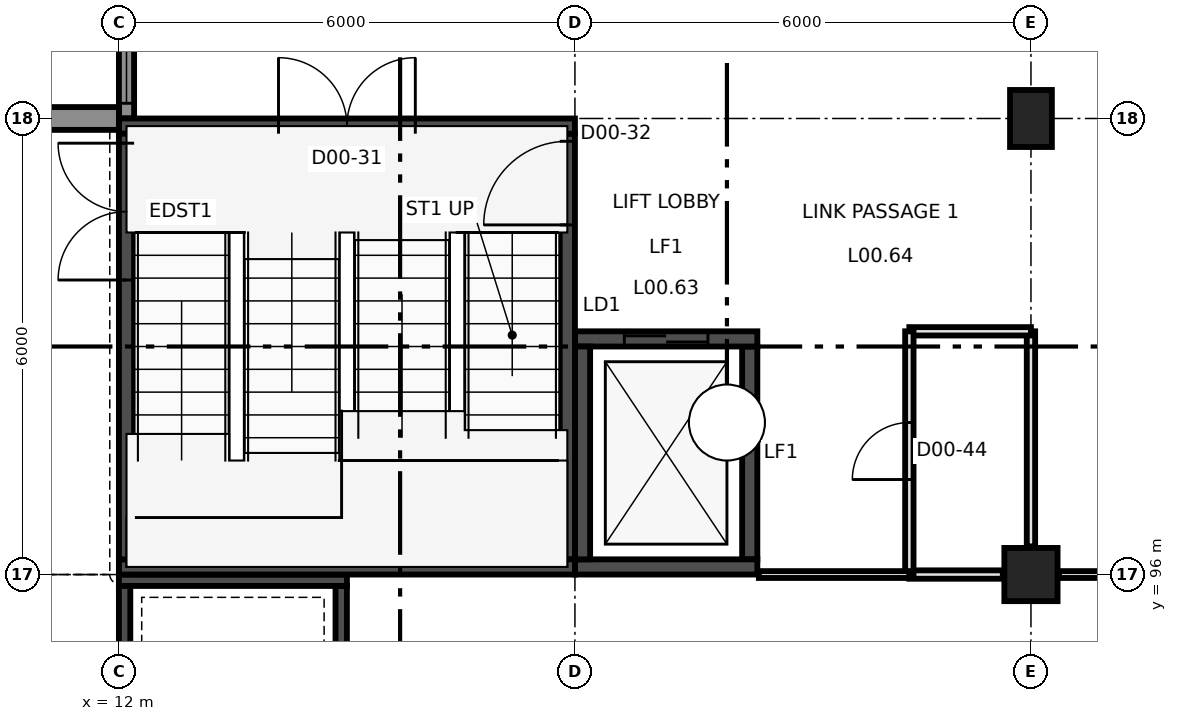
"""IFC4 building model, lengths in metres.
Left out: names, types, materials, properties, quantities, classifications, styles, units other than length and angle.
Written with IfcOpenShell. Run it as: python <this file> out.ifc"""

import sys

from ifc_helpers import new_model, si_unit, direction, frame, frame_2d, origin, origin_2d, place, context, subcontext, project, spatial, polyline, rectangle, outline, extrude, element, fill, save


model = new_model("IFC4")
c1 = context("Model", 3, precision=1e-05, world=origin(), true_north=direction((0.0, 1.0)))
c2 = subcontext(c1, "Body", "Model", "MODEL_VIEW")
j1 = project(units=[si_unit("LENGTHUNIT", "METRE"), si_unit("PLANEANGLEUNIT", "RADIAN")], contexts=[c1])
p1 = place(None, origin())
s1 = spatial("IfcSite", under=j1, at=p1, CompositionType="ELEMENT")
p2 = place(p1, origin())
s2 = spatial("IfcBuilding", under=s1, at=p2, CompositionType="ELEMENT")
p3 = place(p2, origin())
s3 = spatial("IfcBuildingStorey", under=s2, at=p3, CompositionType="ELEMENT", Elevation=0.0)
p4 = place(p3, frame((24.0, 96.0, -0.3), z_axis=(0.0, 0.0, 1.0), x_axis=(1.0, 0.0, 0.0)))
e1 = element("IfcColumn", 1, at=p4, inside=s3, PredefinedType="COLUMN", context=c2, shape_type="SweptSolid", body=[
    extrude(rectangle(XDim=0.7, YDim=0.7, at=origin_2d()), origin(), (0.0, 0.0, 1.0), 7.3),
])
p5 = place(p3, frame((24.0, 102.0, -0.3), z_axis=(0.0, 0.0, 1.0), x_axis=(1.0, 0.0, 0.0)))
e2 = element("IfcColumn", 2, at=p5, inside=s3, PredefinedType="COLUMN", context=c2, shape_type="SweptSolid", body=[
    extrude(rectangle(XDim=0.55, YDim=0.75, at=origin_2d()), origin(), (0.0, 0.0, 1.0), 7.3),
])
p6 = place(p3, frame((12.0, 101.9, -0.3), z_axis=(0.0, 0.0, 1.0), x_axis=(1.0, 0.0, 0.0)))
e3 = element("IfcWall", 3, at=p6, inside=s3, PredefinedType="SHEAR", context=c2, shape_type="SweptSolid", body=[
    extrude(rectangle(XDim=6.0, YDim=0.2, at=frame_2d((3.0, 0.0))), origin(), (0.0, 0.0, 1.0), 7.3),
])
p7 = place(p6, frame((2.1, 0.0, 0.3)))
e4 = element("IfcOpeningElement", 4, at=p7, cuts=e3, PredefinedType="OPENING", context=c2, shape_type="SweptSolid", body=[
    extrude(rectangle(XDim=1.8, YDim=2.2, at=frame_2d((0.9, 1.1))), frame((0.0, 0.11, 0.0), z_axis=(0.0, -1.0, 0.0), x_axis=(1.0, 0.0, 0.0)), (0.0, 0.0, 1.0), 0.22),
])
p8 = place(p3, frame((12.0, 96.1, -0.3), z_axis=(0.0, 0.0, 1.0), x_axis=(1.0, 0.0, 0.0)))
e5 = element("IfcWall", 5, at=p8, inside=s3, PredefinedType="SHEAR", context=c2, shape_type="SweptSolid", body=[
    extrude(rectangle(XDim=6.0, YDim=0.2, at=frame_2d((3.0, 0.0))), origin(), (0.0, 0.0, 1.0), 7.3),
])
p9 = place(p3, frame((12.1, 96.2, -0.3), z_axis=(0.0, 0.0, 1.0), x_axis=(0.0, 1.0, 0.0)))
e6 = element("IfcWall", 6, at=p9, inside=s3, PredefinedType="SHEAR", context=c2, shape_type="SweptSolid", body=[
    extrude(rectangle(XDim=5.6, YDim=0.2, at=frame_2d((2.8, 0.0))), origin(), (0.0, 0.0, 1.0), 7.3),
])
p10 = place(p9, frame((3.675, 0.0, 0.3)))
e7 = element("IfcOpeningElement", 7, at=p10, cuts=e6, PredefinedType="OPENING", context=c2, shape_type="SweptSolid", body=[
    extrude(rectangle(XDim=1.8, YDim=2.4, at=frame_2d((0.9, 1.2))), frame((0.0, 0.11, 0.0), z_axis=(0.0, -1.0, 0.0), x_axis=(1.0, 0.0, 0.0)), (0.0, 0.0, 1.0), 0.22),
])
p11 = place(p3, frame((17.9, 96.2, -0.3), z_axis=(0.0, 0.0, 1.0), x_axis=(0.0, 1.0, 0.0)))
e8 = element("IfcWall", 8, at=p11, inside=s3, PredefinedType="SHEAR", context=c2, shape_type="SweptSolid", body=[
    extrude(rectangle(XDim=5.6, YDim=0.2, at=frame_2d((2.8, 0.0))), origin(), (0.0, 0.0, 1.0), 7.3),
])
p12 = place(p11, frame((4.4, 0.0, 0.3)))
e9 = element("IfcOpeningElement", 9, at=p12, cuts=e8, PredefinedType="OPENING", context=c2, shape_type="SweptSolid", body=[
    extrude(rectangle(XDim=1.1, YDim=2.2, at=frame_2d((0.55, 1.1))), frame((0.0, 0.11, 0.0), z_axis=(0.0, -1.0, 0.0), x_axis=(1.0, 0.0, 0.0)), (0.0, 0.0, 1.0), 0.22),
])
p13 = place(p3, frame((18.0, 99.1, -1.4), z_axis=(0.0, 0.0, 1.0), x_axis=(1.0, 0.0, 0.0)))
e10 = element("IfcWall", 10, at=p13, inside=s3, PredefinedType="SHEAR", context=c2, shape_type="SweptSolid", body=[
    extrude(rectangle(XDim=2.4, YDim=0.2, at=frame_2d((1.2, 0.0))), origin(), (0.0, 0.0, 1.0), 8.4),
])
p14 = place(p13, frame((0.65, 0.0, 1.4)))
e11 = element("IfcOpeningElement", 11, at=p14, cuts=e10, PredefinedType="OPENING", context=c2, shape_type="SweptSolid", body=[
    extrude(rectangle(XDim=1.1, YDim=2.1, at=frame_2d((0.55, 1.05))), frame((0.0, 0.11, 0.0), z_axis=(0.0, -1.0, 0.0), x_axis=(1.0, 0.0, 0.0)), (0.0, 0.0, 1.0), 0.22),
])
p15 = place(p3, frame((18.0, 96.1, -1.4), z_axis=(0.0, 0.0, 1.0), x_axis=(1.0, 0.0, 0.0)))
e12 = element("IfcWall", 12, at=p15, inside=s3, PredefinedType="SHEAR", context=c2, shape_type="SweptSolid", body=[
    extrude(rectangle(XDim=2.4, YDim=0.2, at=frame_2d((1.2, 0.0))), origin(), (0.0, 0.0, 1.0), 8.4),
])
for number, where, z_axis, x_axis in (
    (13, (18.1, 96.2, -1.4), (0.0, 0.0, 1.0), (0.0, 1.0, 0.0)),
    (14, (20.3, 96.2, -1.4), (0.0, 0.0, 1.0), (0.0, 1.0, 0.0)),
):
    element("IfcWall", number, at=place(p3, frame(where, z_axis=z_axis, x_axis=x_axis)), inside=s3, PredefinedType="SHEAR", context=c2, shape_type="SweptSolid", body=[
        extrude(rectangle(XDim=2.8, YDim=0.2, at=frame_2d((1.4, 0.0))), origin(), (0.0, 0.0, 1.0), 8.4),
    ])
p16 = place(p3, frame((12.0, 95.925, -0.3), z_axis=(0.0, 0.0, 1.0), x_axis=(1.0, 0.0, 0.0)))
e15 = element("IfcWall", 15, at=p16, inside=s3, PredefinedType="SHEAR", context=c2, shape_type="SweptSolid", body=[
    extrude(rectangle(XDim=3.0, YDim=0.15, at=frame_2d((1.5, 0.0))), origin(), (0.0, 0.0, 1.0), 7.3),
])
for number, where, z_axis, x_axis in (
    (16, (12.075, 90.15, -0.3), (0.0, 0.0, 1.0), (0.0, 1.0, 0.0)),
    (17, (14.925, 90.15, -0.3), (0.0, 0.0, 1.0), (0.0, 1.0, 0.0)),
):
    element("IfcWall", number, at=place(p3, frame(where, z_axis=z_axis, x_axis=x_axis)), inside=s3, PredefinedType="SHEAR", context=c2, shape_type="SweptSolid", body=[
        extrude(rectangle(XDim=5.7, YDim=0.15, at=frame_2d((2.85, 0.0))), origin(), (0.0, 0.0, 1.0), 7.3),
    ])
p17 = place(p3, frame((12.1, 102.0, 0.0), z_axis=(0.0, 0.0, 1.0), x_axis=(0.0, 1.0, 0.0)))
e18 = element("IfcWall", 18, at=p17, inside=s3, PredefinedType="SOLIDWALL", context=c2, shape_type="SweptSolid", body=[
    extrude(rectangle(XDim=5.775, YDim=0.2, at=frame_2d((2.887, 0.0))), origin(), (0.0, 0.0, 1.0), 6.15),
])
p18 = place(p17, frame((2.07, 0.0, 0.0)))
e19 = element("IfcOpeningElement", 19, at=p18, cuts=e18, PredefinedType="OPENING", context=c2, shape_type="SweptSolid", body=[
    extrude(rectangle(XDim=1.8, YDim=2.4, at=frame_2d((0.9, 1.2))), frame((0.0, 0.11, 0.0), z_axis=(0.0, -1.0, 0.0), x_axis=(1.0, 0.0, 0.0)), (0.0, 0.0, 1.0), 0.22),
])
p19 = place(p17, frame((2.07, 0.0, 2.5)))
e20 = element("IfcOpeningElement", 20, at=p19, cuts=e18, PredefinedType="OPENING", context=c2, shape_type="SweptSolid", body=[
    extrude(rectangle(XDim=1.8, YDim=3.3, at=frame_2d((0.9, 1.65))), frame((0.0, 0.11, 0.0), z_axis=(0.0, -1.0, 0.0), x_axis=(1.0, 0.0, 0.0)), (0.0, 0.0, 1.0), 0.22),
])
p20 = place(p17, frame((0.2, 0.0, 0.1)))
e21 = element("IfcOpeningElement", 21, at=p20, cuts=e18, PredefinedType="OPENING", context=c2, shape_type="SweptSolid", body=[
    extrude(rectangle(XDim=1.87, YDim=5.7, at=frame_2d((0.935, 2.85))), frame((0.0, 0.11, 0.0), z_axis=(0.0, -1.0, 0.0), x_axis=(1.0, 0.0, 0.0)), (0.0, 0.0, 1.0), 0.22),
])
p21 = place(p17, frame((3.87, 0.0, 0.1)))
e22 = element("IfcOpeningElement", 22, at=p21, cuts=e18, PredefinedType="OPENING", context=c2, shape_type="SweptSolid", body=[
    extrude(rectangle(XDim=1.705, YDim=5.7, at=frame_2d((0.853, 2.85))), frame((0.0, 0.11, 0.0), z_axis=(0.0, -1.0, 0.0), x_axis=(1.0, 0.0, 0.0)), (0.0, 0.0, 1.0), 0.22),
])
p22 = place(p3, frame((6.3, 102.0, 6.05), z_axis=(0.0, -1.0, 0.0), x_axis=(0.0, 0.0, -1.0)))
e23 = element("IfcWall", 23, at=p22, inside=s3, PredefinedType="SOLIDWALL", context=c2, shape_type="SweptSolid", body=[
    extrude(outline(polyline([(0.0, 0.0), (6.05, 0.0), (6.05, 0.25), (2.05, 0.25), (1.677, 0.285), (1.318, 0.389), (0.984, 0.559), (0.688, 0.787), (0.44, 1.068), (0.248, 1.389), (0.12, 1.741), (0.06, 2.11), (0.07, 2.484), (0.15, 2.85), (0.07, 3.216), (0.06, 3.59), (0.12, 3.959), (0.248, 4.311), (0.44, 4.632), (0.688, 4.913), (0.984, 5.141), (1.318, 5.311), (1.677, 5.415), (2.05, 5.45), (6.05, 5.45), (6.05, 5.7), (0.0, 5.7), (0.0, 0.0)])), origin(), (0.0, 0.0, -1.0), 0.3),
])
p23 = place(p3, frame((22.4, 96.0, 0.0), z_axis=(0.0, 0.0, 1.0), x_axis=(1.0, 0.0, 0.0)))
e24 = element("IfcWall", 24, at=p23, inside=s3, PredefinedType="PARTITIONING", context=c2, shape_type="SweptSolid", body=[
    extrude(rectangle(XDim=1.23, YDim=0.11, at=frame_2d((0.615, 0.0))), origin(), (0.0, 0.0, 1.0), 6.15),
])
p24 = place(p3, frame((24.0, 96.37, 0.0), z_axis=(0.0, 0.0, 1.0), x_axis=(0.0, 1.0, 0.0)))
e25 = element("IfcWall", 25, at=p24, inside=s3, PredefinedType="PARTITIONING", context=c2, shape_type="SweptSolid", body=[
    extrude(rectangle(XDim=2.83, YDim=0.11, at=frame_2d((1.415, 0.0))), origin(), (0.0, 0.0, 1.0), 2.75),
])
p25 = place(p3, frame((22.4, 99.2, 0.0), z_axis=(0.0, 0.0, 1.0), x_axis=(1.0, 0.0, 0.0)))
e26 = element("IfcWall", 26, at=p25, inside=s3, PredefinedType="PARTITIONING", context=c2, shape_type="SweptSolid", body=[
    extrude(rectangle(XDim=1.6, YDim=0.11, at=frame_2d((0.8, 0.0))), origin(), (0.0, 0.0, 1.0), 2.75),
])
p26 = place(p3, frame((22.4, 96.0, 0.0), z_axis=(0.0, 0.0, 1.0), x_axis=(0.0, 1.0, 0.0)))
e27 = element("IfcWall", 27, at=p26, inside=s3, PredefinedType="PARTITIONING", context=c2, shape_type="SweptSolid", body=[
    extrude(rectangle(XDim=3.2, YDim=0.11, at=frame_2d((1.6, 0.0))), origin(), (0.0, 0.0, 1.0), 6.15),
])
p27 = place(p26, frame((1.25, 0.0, 0.0)))
e28 = element("IfcOpeningElement", 28, at=p27, cuts=e27, PredefinedType="OPENING", context=c2, shape_type="SweptSolid", body=[
    extrude(rectangle(XDim=0.75, YDim=2.04, at=frame_2d((0.375, 1.02))), frame((0.0, 0.065, 0.0), z_axis=(0.0, -1.0, 0.0), x_axis=(1.0, 0.0, 0.0)), (0.0, 0.0, 1.0), 0.13),
])
p28 = place(p3, frame((20.42, 96.0, 0.0), z_axis=(0.0, 0.0, 1.0), x_axis=(1.0, 0.0, 0.0)))
e29 = element("IfcWall", 29, at=p28, inside=s3, PredefinedType="PARTITIONING", context=c2, shape_type="SweptSolid", body=[
    extrude(rectangle(XDim=1.98, YDim=0.09, at=frame_2d((0.99, 0.0))), origin(), (0.0, 0.0, 1.0), 6.15),
])
p29 = place(p3, frame((24.37, 96.0, 0.0), z_axis=(0.0, 0.0, 1.0), x_axis=(1.0, 0.0, 0.0)))
e30 = element("IfcWall", 30, at=p29, inside=s3, PredefinedType="PARTITIONING", context=c2, shape_type="SweptSolid", body=[
    extrude(rectangle(XDim=3.63, YDim=0.09, at=frame_2d((1.815, 0.0))), origin(), (0.0, 0.0, 1.0), 2.75),
])
p30 = place(p20, origin())
e31 = element("IfcWindow", 31, at=p30, inside=s3, PartitioningType="SINGLE_PANEL", PredefinedType="WINDOW", context=c2, shape_type="SweptSolid", body=[
    extrude(rectangle(XDim=1.87, YDim=5.7, at=frame_2d((0.935, 2.85))), frame((0.0, 0.03, 0.0), z_axis=(0.0, -1.0, 0.0), x_axis=(1.0, 0.0, 0.0)), (0.0, 0.0, 1.0), 0.06),
])
fill(e21, e31)
p31 = place(p10, origin())
e32 = element("IfcDoor", 32, at=p31, inside=s3, OperationType="DOUBLE_DOOR_SINGLE_SWING", PredefinedType="DOOR", context=c2, shape_type="SweptSolid", body=[
    extrude(rectangle(XDim=1.8, YDim=2.4, at=frame_2d((0.9, 1.2))), frame((0.0, 0.025, 0.0), z_axis=(0.0, -1.0, 0.0), x_axis=(1.0, 0.0, 0.0)), (0.0, 0.0, 1.0), 0.05),
])
fill(e7, e32)
p32 = place(p7, frame((1.8, 0.0, 0.0), z_axis=(0.0, 0.0, 1.0), x_axis=(-1.0, 0.0, 0.0)))
e33 = element("IfcDoor", 33, at=p32, inside=s3, OperationType="DOUBLE_DOOR_SINGLE_SWING", PredefinedType="DOOR", context=c2, shape_type="SweptSolid", body=[
    extrude(rectangle(XDim=1.8, YDim=2.2, at=frame_2d((0.9, 1.1))), frame((0.0, 0.025, 0.0), z_axis=(0.0, -1.0, 0.0), x_axis=(1.0, 0.0, 0.0)), (0.0, 0.0, 1.0), 0.05),
])
fill(e4, e33)
p33 = place(p12, origin())
e34 = element("IfcDoor", 34, at=p33, inside=s3, OperationType="SINGLE_SWING_LEFT", PredefinedType="DOOR", context=c2, shape_type="SweptSolid", body=[
    extrude(rectangle(XDim=1.1, YDim=2.2, at=frame_2d((0.55, 1.1))), frame((0.0, 0.025, 0.0), z_axis=(0.0, -1.0, 0.0), x_axis=(1.0, 0.0, 0.0)), (0.0, 0.0, 1.0), 0.05),
])
fill(e9, e34)
p34 = place(p27, frame((0.75, 0.0, 0.0), z_axis=(0.0, 0.0, 1.0), x_axis=(-1.0, 0.0, 0.0)))
e35 = element("IfcDoor", 35, at=p34, inside=s3, OperationType="SINGLE_SWING_LEFT", PredefinedType="DOOR", context=c2, shape_type="SweptSolid", body=[
    extrude(rectangle(XDim=0.75, YDim=2.04, at=frame_2d((0.375, 1.02))), frame((0.0, 0.025, 0.0), z_axis=(0.0, -1.0, 0.0), x_axis=(1.0, 0.0, 0.0)), (0.0, 0.0, 1.0), 0.05),
])
fill(e28, e35)
p35 = place(p14, origin())
e36 = element("IfcDoor", 36, at=p35, inside=s3, OperationType="DOUBLE_DOOR_SLIDING", PredefinedType="DOOR", context=c2, shape_type="SweptSolid", body=[
    extrude(rectangle(XDim=1.1, YDim=2.1, at=frame_2d((0.55, 1.05))), frame((0.0, 0.025, 0.0), z_axis=(0.0, -1.0, 0.0), x_axis=(1.0, 0.0, 0.0)), (0.0, 0.0, 1.0), 0.05),
])
fill(e11, e36)
save(model, sys.argv[1])
